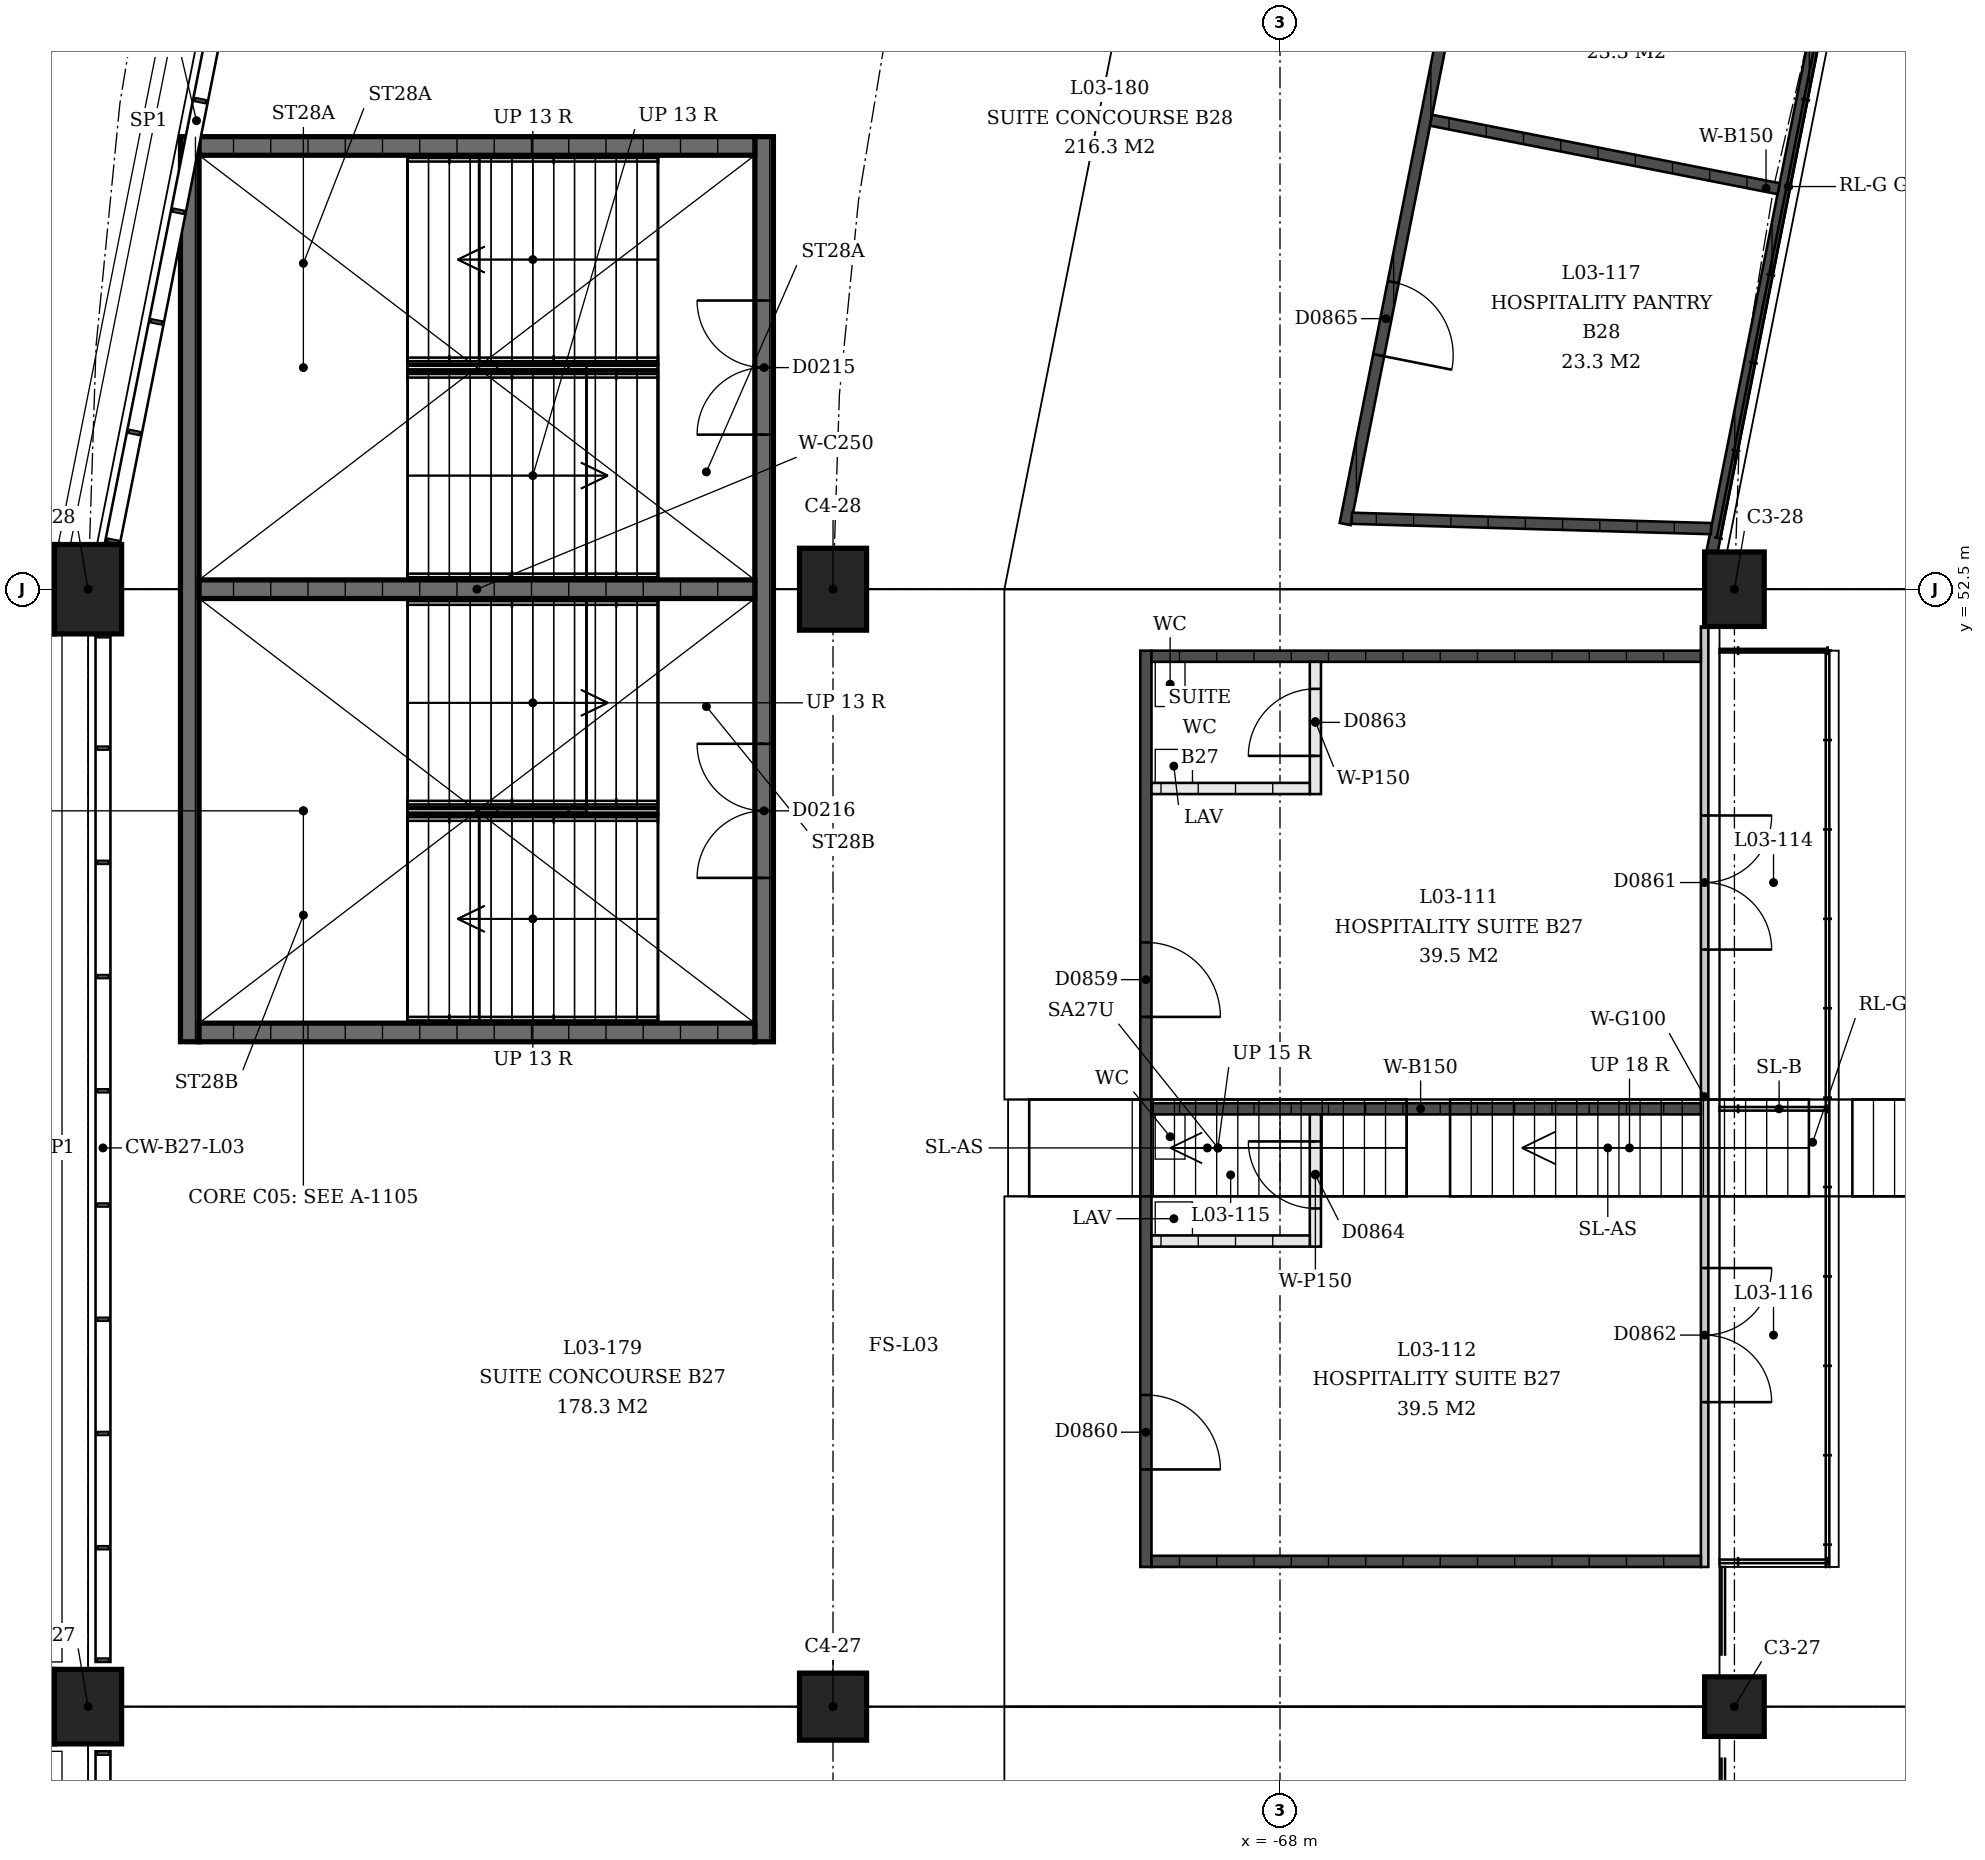
"""IFC4 building model, lengths in metres.
Left out: names, types, materials, properties, quantities, classifications, styles, units other than length and angle.
Written with IfcOpenShell. Run it as: python <this file> out.ifc"""

import sys

from ifc_helpers import new_model, si_unit, direction, frame, frame_2d, origin, origin_2d, place, context, subcontext, project, spatial, rectangle, extrude, element, fill, save


model = new_model("IFC4")
c1 = context("Model", 3, precision=1e-05, world=origin(), true_north=direction((0.0, 1.0)))
c2 = subcontext(c1, "Body", "Model", "MODEL_VIEW")
j1 = project(units=[si_unit("LENGTHUNIT", "METRE"), si_unit("PLANEANGLEUNIT", "RADIAN")], contexts=[c1])
p1 = place(None, origin())
s1 = spatial("IfcSite", under=j1, at=p1, CompositionType="ELEMENT")
p2 = place(p1, origin())
s2 = spatial("IfcBuilding", under=s1, at=p2, CompositionType="ELEMENT")
p3 = place(p2, frame((0.0, 0.0, 13.5)))
s3 = spatial("IfcBuildingStorey", under=s2, at=p3, CompositionType="ELEMENT", Elevation=13.5)
p4 = place(p3, frame((-61.9, 37.5, 0.0), z_axis=(0.0, 0.0, 1.0), x_axis=(0.0, -1.0, 0.0)))
e1 = element("IfcColumn", 1, at=p4, inside=s3, PredefinedType="COLUMN", context=c2, shape_type="SweptSolid", body=[
    extrude(rectangle(XDim=0.8, YDim=0.8, at=origin_2d()), origin(), (0.0, 0.0, 1.0), 2.033),
])
p5 = place(p3, frame((-74.0, 37.5, 0.0), z_axis=(0.0, 0.0, 1.0), x_axis=(0.0, -1.0, 0.0)))
e2 = element("IfcColumn", 2, at=p5, inside=s3, PredefinedType="COLUMN", context=c2, shape_type="SweptSolid", body=[
    extrude(rectangle(XDim=0.9, YDim=0.9, at=origin_2d()), origin(), (0.0, 0.0, 1.0), 4.5),
])
p6 = place(p3, frame((-84.0, 37.5, 0.0), z_axis=(0.0, 0.0, 1.0), x_axis=(0.0, -1.0, 0.0)))
e3 = element("IfcColumn", 3, at=p6, inside=s3, PredefinedType="COLUMN", context=c2, shape_type="SweptSolid", body=[
    extrude(rectangle(XDim=1.0, YDim=0.9, at=origin_2d()), origin(), (0.0, 0.0, 1.0), 4.5),
])
p7 = place(p3, frame((-61.9, 52.5, 0.0), z_axis=(0.0, 0.0, 1.0), x_axis=(0.0, -1.0, 0.0)))
e4 = element("IfcColumn", 4, at=p7, inside=s3, PredefinedType="COLUMN", context=c2, shape_type="SweptSolid", body=[
    extrude(rectangle(XDim=1.0, YDim=0.8, at=origin_2d()), origin(), (0.0, 0.0, 1.0), 2.033),
])
p8 = place(p3, frame((-74.0, 52.5, 0.0), z_axis=(0.0, 0.0, 1.0), x_axis=(0.0, -1.0, 0.0)))
e5 = element("IfcColumn", 5, at=p8, inside=s3, PredefinedType="COLUMN", context=c2, shape_type="SweptSolid", body=[
    extrude(rectangle(XDim=1.1, YDim=0.9, at=origin_2d()), origin(), (0.0, 0.0, 1.0), 4.5),
])
p9 = place(p3, frame((-84.0, 52.5, 0.0), z_axis=(0.0, 0.0, 1.0), x_axis=(0.0, -1.0, 0.0)))
e6 = element("IfcColumn", 6, at=p9, inside=s3, PredefinedType="COLUMN", context=c2, shape_type="SweptSolid", body=[
    extrude(rectangle(XDim=1.2, YDim=0.9, at=origin_2d()), origin(), (0.0, 0.0, 1.0), 4.5),
])
p10 = place(p3, frame((-74.925, 58.575, 0.0), z_axis=(0.0, 0.0, 1.0), x_axis=(0.0, -1.0, 0.0)))
e7 = element("IfcWall", 7, at=p10, inside=s3, PredefinedType="SHEAR", context=c2, shape_type="SweptSolid", body=[
    extrude(rectangle(XDim=12.15, YDim=0.25, at=frame_2d((6.075, 0.0))), origin(), (0.0, 0.0, 1.0), 4.09),
])
p11 = place(p10, frame((2.2, 0.0, 0.0)))
e8 = element("IfcOpeningElement", 8, at=p11, cuts=e7, PredefinedType="OPENING", context=c2, shape_type="SweptSolid", body=[
    extrude(rectangle(XDim=1.8, YDim=2.1, at=frame_2d((0.9, 1.05))), frame((0.0, 0.125, 0.0), z_axis=(0.0, -1.0, 0.0), x_axis=(1.0, 0.0, 0.0)), (0.0, 0.0, 1.0), 0.25),
])
p12 = place(p10, frame((8.15, 0.0, 0.0)))
e9 = element("IfcOpeningElement", 9, at=p12, cuts=e7, PredefinedType="OPENING", context=c2, shape_type="SweptSolid", body=[
    extrude(rectangle(XDim=1.8, YDim=2.1, at=frame_2d((0.9, 1.05))), frame((0.0, 0.125, 0.0), z_axis=(0.0, -1.0, 0.0), x_axis=(1.0, 0.0, 0.0)), (0.0, 0.0, 1.0), 0.25),
])
p13 = place(p3, frame((-82.635, 58.575, 0.0), z_axis=(0.0, 0.0, 1.0), x_axis=(0.0, -1.0, 0.0)))
e10 = element("IfcWall", 10, at=p13, inside=s3, PredefinedType="SHEAR", context=c2, shape_type="SweptSolid", body=[
    extrude(rectangle(XDim=12.15, YDim=0.25, at=frame_2d((6.075, 0.0))), origin(), (0.0, 0.0, 1.0), 4.09),
])
for number, where, z_axis, x_axis in (
    (11, (-75.05, 58.45, 0.0), (0.0, 0.0, 1.0), (-1.0, 0.0, 0.0)),
    (12, (-75.05, 46.55, 0.0), (0.0, 0.0, 1.0), (-1.0, 0.0, 0.0)),
    (13, (-75.05, 52.5, 0.0), (0.0, 0.0, 1.0), (-1.0, 0.0, 0.0)),
):
    element("IfcWall", number, at=place(p3, frame(where, z_axis=z_axis, x_axis=x_axis)), inside=s3, PredefinedType="SHEAR", context=c2, shape_type="SweptSolid", body=[
        extrude(rectangle(XDim=7.46, YDim=0.25, at=frame_2d((3.73, 0.0))), origin(), (0.0, 0.0, 1.0), 4.09),
    ])
p14 = place(p3, frame((-62.3, 52.0, 0.0), z_axis=(0.0, 0.0, 1.0), x_axis=(0.0, -1.0, 0.0)))
e14 = element("IfcWall", 14, at=p14, inside=s3, PredefinedType="PARTITIONING", context=c2, shape_type="SweptSolid", body=[
    extrude(rectangle(XDim=12.625, YDim=0.1, at=frame_2d((6.312, 0.0))), origin(), (0.0, 0.0, 1.0), 3.0),
])
p15 = place(p14, frame((2.538, 0.0, 0.0)))
e15 = element("IfcOpeningElement", 15, at=p15, cuts=e14, PredefinedType="OPENING", context=c2, shape_type="SweptSolid", body=[
    extrude(rectangle(XDim=1.8, YDim=2.1, at=frame_2d((0.9, 1.05))), frame((0.0, 0.05, 0.0), z_axis=(0.0, -1.0, 0.0), x_axis=(1.0, 0.0, 0.0)), (0.0, 0.0, 1.0), 0.1),
])
p16 = place(p14, frame((8.613, 0.0, 0.0)))
e16 = element("IfcOpeningElement", 16, at=p16, cuts=e14, PredefinedType="OPENING", context=c2, shape_type="SweptSolid", body=[
    extrude(rectangle(XDim=1.8, YDim=2.1, at=frame_2d((0.9, 1.05))), frame((0.0, 0.05, 0.0), z_axis=(0.0, -1.0, 0.0), x_axis=(1.0, 0.0, 0.0)), (0.0, 0.0, 1.0), 0.1),
])
p17 = place(p3, frame((-69.8, 51.675, 0.0), z_axis=(0.0, 0.0, 1.0), x_axis=(0.0, -1.0, 0.0)))
e17 = element("IfcWall", 17, at=p17, inside=s3, PredefinedType="SOLIDWALL", context=c2, shape_type="SweptSolid", body=[
    extrude(rectangle(XDim=12.3, YDim=0.15, at=frame_2d((6.15, 0.0))), origin(), (0.0, 0.0, 1.0), 3.0),
])
p18 = place(p17, frame((3.916, 0.0, 0.0)))
e18 = element("IfcOpeningElement", 18, at=p18, cuts=e17, PredefinedType="OPENING", context=c2, shape_type="SweptSolid", body=[
    extrude(rectangle(XDim=1.0, YDim=2.1, at=frame_2d((0.5, 1.05))), frame((0.0, 0.075, 0.0), z_axis=(0.0, -1.0, 0.0), x_axis=(1.0, 0.0, 0.0)), (0.0, 0.0, 1.0), 0.15),
])
p19 = place(p17, frame((9.991, 0.0, 0.0)))
e19 = element("IfcOpeningElement", 19, at=p19, cuts=e17, PredefinedType="OPENING", context=c2, shape_type="SweptSolid", body=[
    extrude(rectangle(XDim=1.0, YDim=2.1, at=frame_2d((0.5, 1.05))), frame((0.0, 0.075, 0.0), z_axis=(0.0, -1.0, 0.0), x_axis=(1.0, 0.0, 0.0)), (0.0, 0.0, 1.0), 0.15),
])
for number, where, z_axis, x_axis in (
    (20, (-62.35, 51.6, 0.0), (0.0, 0.0, 1.0), (-1.0, 0.0, 0.0)),
    (21, (-62.35, 45.525, 0.0), (0.0, 0.0, 1.0), (-1.0, 0.0, 0.0)),
    (22, (-62.35, 39.45, 0.0), (0.0, 0.0, 1.0), (-1.0, 0.0, 0.0)),
):
    element("IfcWall", number, at=place(p3, frame(where, z_axis=z_axis, x_axis=x_axis)), inside=s3, PredefinedType="SOLIDWALL", context=c2, shape_type="SweptSolid", body=[
        extrude(rectangle(XDim=7.375, YDim=0.15, at=frame_2d((3.688, 0.0))), origin(), (0.0, 0.0, 1.0), 3.0),
    ])
p20 = place(p3, frame((-67.525, 51.525, 0.0), z_axis=(0.0, 0.0, 1.0), x_axis=(0.0, -1.0, 0.0)))
e23 = element("IfcWall", 23, at=p20, inside=s3, PredefinedType="PARTITIONING", context=c2, shape_type="SweptSolid", body=[
    extrude(rectangle(XDim=1.775, YDim=0.15, at=frame_2d((0.887, 0.0))), origin(), (0.0, 0.0, 1.0), 3.0),
])
p21 = place(p20, frame((0.363, 0.0, 0.0)))
e24 = element("IfcOpeningElement", 24, at=p21, cuts=e23, PredefinedType="OPENING", context=c2, shape_type="SweptSolid", body=[
    extrude(rectangle(XDim=0.9, YDim=2.1, at=frame_2d((0.45, 1.05))), frame((0.0, 0.075, 0.0), z_axis=(0.0, -1.0, 0.0), x_axis=(1.0, 0.0, 0.0)), (0.0, 0.0, 1.0), 0.15),
])
p22 = place(p3, frame((-67.6, 49.825, 0.0), z_axis=(0.0, 0.0, 1.0), x_axis=(-1.0, 0.0, 0.0)))
e25 = element("IfcWall", 25, at=p22, inside=s3, PredefinedType="PARTITIONING", context=c2, shape_type="SweptSolid", body=[
    extrude(rectangle(XDim=2.125, YDim=0.15, at=frame_2d((1.062, 0.0))), origin(), (0.0, 0.0, 1.0), 3.0),
])
p23 = place(p3, frame((-67.525, 45.45, 0.0), z_axis=(0.0, 0.0, 1.0), x_axis=(0.0, -1.0, 0.0)))
e26 = element("IfcWall", 26, at=p23, inside=s3, PredefinedType="PARTITIONING", context=c2, shape_type="SweptSolid", body=[
    extrude(rectangle(XDim=1.775, YDim=0.15, at=frame_2d((0.887, 0.0))), origin(), (0.0, 0.0, 1.0), 3.0),
])
p24 = place(p23, frame((0.363, 0.0, 0.0)))
e27 = element("IfcOpeningElement", 27, at=p24, cuts=e26, PredefinedType="OPENING", context=c2, shape_type="SweptSolid", body=[
    extrude(rectangle(XDim=0.9, YDim=2.1, at=frame_2d((0.45, 1.05))), frame((0.0, 0.075, 0.0), z_axis=(0.0, -1.0, 0.0), x_axis=(1.0, 0.0, 0.0)), (0.0, 0.0, 1.0), 0.15),
])
p25 = place(p3, frame((-67.6, 43.75, 0.0), z_axis=(0.0, 0.0, 1.0), x_axis=(-1.0, 0.0, 0.0)))
e28 = element("IfcWall", 28, at=p25, inside=s3, PredefinedType="PARTITIONING", context=c2, shape_type="SweptSolid", body=[
    extrude(rectangle(XDim=2.125, YDim=0.15, at=frame_2d((1.062, 0.0))), origin(), (0.0, 0.0, 1.0), 3.0),
])
p26 = place(p3, frame((-62.2, 53.0, 0.0), z_axis=(0.0, 0.0, 1.0), x_axis=(0.195076647143, 0.980788000406, 0.0)))
e29 = element("IfcWall", 29, at=p26, inside=s3, PredefinedType="SOLIDWALL", context=c2, shape_type="SweptSolid", body=[
    extrude(rectangle(XDim=9.667, YDim=0.15, at=frame_2d((4.833, 0.0))), origin(), (0.0, 0.0, 1.0), 3.0),
])
p27 = place(p3, frame((-67.126, 53.375, 0.0), z_axis=(0.0, 0.0, 1.0), x_axis=(0.195090821685, 0.980785181013, 0.0)))
e30 = element("IfcWall", 30, at=p27, inside=s3, PredefinedType="SOLIDWALL", context=c2, shape_type="SweptSolid", body=[
    extrude(rectangle(XDim=11.083, YDim=0.15, at=frame_2d((5.541, 0.0))), origin(), (0.0, 0.0, 1.0), 3.0),
])
p28 = place(p27, frame((2.311, 0.0, 0.0)))
e31 = element("IfcOpeningElement", 31, at=p28, cuts=e30, PredefinedType="OPENING", context=c2, shape_type="SweptSolid", body=[
    extrude(rectangle(XDim=1.0, YDim=2.1, at=frame_2d((0.5, 1.05))), frame((0.0, 0.075, 0.0), z_axis=(0.0, -1.0, 0.0), x_axis=(1.0, 0.0, 0.0)), (0.0, 0.0, 1.0), 0.15),
])
p29 = place(p27, frame((7.771, 0.0, 0.0)))
e32 = element("IfcOpeningElement", 32, at=p29, cuts=e30, PredefinedType="OPENING", context=c2, shape_type="SweptSolid", body=[
    extrude(rectangle(XDim=1.0, YDim=2.1, at=frame_2d((0.5, 1.05))), frame((0.0, 0.075, 0.0), z_axis=(0.0, -1.0, 0.0), x_axis=(1.0, 0.0, 0.0)), (0.0, 0.0, 1.0), 0.15),
])
p30 = place(p3, frame((-62.213, 53.313, 0.0), z_axis=(0.0, 0.0, 1.0), x_axis=(-0.999585372371, 0.028793807365, 0.0)))
e33 = element("IfcWall", 33, at=p30, inside=s3, PredefinedType="SOLIDWALL", context=c2, shape_type="SweptSolid", body=[
    extrude(rectangle(XDim=4.824, YDim=0.15, at=frame_2d((2.412, 0.0))), origin(), (0.0, 0.0, 1.0), 3.0),
])
p31 = place(p3, frame((-61.306, 57.876, 0.0), z_axis=(0.0, 0.0, 1.0), x_axis=(-0.98116065749, 0.193193592529, 0.0)))
e34 = element("IfcWall", 34, at=p31, inside=s3, PredefinedType="SOLIDWALL", context=c2, shape_type="SweptSolid", body=[
    extrude(rectangle(XDim=4.757, YDim=0.15, at=frame_2d((2.378, 0.0))), origin(), (0.0, 0.0, 1.0), 3.0),
])
p32 = place(p11, origin())
e35 = element("IfcDoor", 35, at=p32, inside=s3, OperationType="DOUBLE_DOOR_SINGLE_SWING", PredefinedType="DOOR", context=c2, shape_type="SweptSolid", body=[
    extrude(rectangle(XDim=1.8, YDim=2.1, at=frame_2d((0.9, 1.05))), frame((0.0, 0.025, 0.0), z_axis=(0.0, -1.0, 0.0), x_axis=(1.0, 0.0, 0.0)), (0.0, 0.0, 1.0), 0.05),
])
fill(e8, e35)
p33 = place(p12, origin())
e36 = element("IfcDoor", 36, at=p33, inside=s3, OperationType="DOUBLE_DOOR_SINGLE_SWING", PredefinedType="DOOR", context=c2, shape_type="SweptSolid", body=[
    extrude(rectangle(XDim=1.8, YDim=2.1, at=frame_2d((0.9, 1.05))), frame((0.0, 0.025, 0.0), z_axis=(0.0, -1.0, 0.0), x_axis=(1.0, 0.0, 0.0)), (0.0, 0.0, 1.0), 0.05),
])
fill(e9, e36)
p34 = place(p18, origin())
e37 = element("IfcDoor", 37, at=p34, inside=s3, OperationType="SINGLE_SWING_LEFT", PredefinedType="DOOR", context=c2, shape_type="SweptSolid", body=[
    extrude(rectangle(XDim=1.0, YDim=2.1, at=frame_2d((0.5, 1.05))), frame((0.0, 0.025, 0.0), z_axis=(0.0, -1.0, 0.0), x_axis=(1.0, 0.0, 0.0)), (0.0, 0.0, 1.0), 0.05),
])
fill(e18, e37)
p35 = place(p19, origin())
e38 = element("IfcDoor", 38, at=p35, inside=s3, OperationType="SINGLE_SWING_LEFT", PredefinedType="DOOR", context=c2, shape_type="SweptSolid", body=[
    extrude(rectangle(XDim=1.0, YDim=2.1, at=frame_2d((0.5, 1.05))), frame((0.0, 0.025, 0.0), z_axis=(0.0, -1.0, 0.0), x_axis=(1.0, 0.0, 0.0)), (0.0, 0.0, 1.0), 0.05),
])
fill(e19, e38)
p36 = place(p15, origin())
e39 = element("IfcDoor", 39, at=p36, inside=s3, OperationType="DOUBLE_DOOR_SINGLE_SWING", PredefinedType="DOOR", context=c2, shape_type="SweptSolid", body=[
    extrude(rectangle(XDim=1.8, YDim=2.1, at=frame_2d((0.9, 1.05))), frame((0.0, 0.025, 0.0), z_axis=(0.0, -1.0, 0.0), x_axis=(1.0, 0.0, 0.0)), (0.0, 0.0, 1.0), 0.05),
])
fill(e15, e39)
p37 = place(p16, origin())
e40 = element("IfcDoor", 40, at=p37, inside=s3, OperationType="DOUBLE_DOOR_SINGLE_SWING", PredefinedType="DOOR", context=c2, shape_type="SweptSolid", body=[
    extrude(rectangle(XDim=1.8, YDim=2.1, at=frame_2d((0.9, 1.05))), frame((0.0, 0.025, 0.0), z_axis=(0.0, -1.0, 0.0), x_axis=(1.0, 0.0, 0.0)), (0.0, 0.0, 1.0), 0.05),
])
fill(e16, e40)
p38 = place(p21, origin())
e41 = element("IfcDoor", 41, at=p38, inside=s3, OperationType="SINGLE_SWING_RIGHT", PredefinedType="DOOR", context=c2, shape_type="SweptSolid", body=[
    extrude(rectangle(XDim=0.9, YDim=2.1, at=frame_2d((0.45, 1.05))), frame((0.0, 0.025, 0.0), z_axis=(0.0, -1.0, 0.0), x_axis=(1.0, 0.0, 0.0)), (0.0, 0.0, 1.0), 0.05),
])
fill(e24, e41)
p39 = place(p24, origin())
e42 = element("IfcDoor", 42, at=p39, inside=s3, OperationType="SINGLE_SWING_LEFT", PredefinedType="DOOR", context=c2, shape_type="SweptSolid", body=[
    extrude(rectangle(XDim=0.9, YDim=2.1, at=frame_2d((0.45, 1.05))), frame((0.0, 0.025, 0.0), z_axis=(0.0, -1.0, 0.0), x_axis=(1.0, 0.0, 0.0)), (0.0, 0.0, 1.0), 0.05),
])
fill(e27, e42)
p40 = place(p28, origin())
e43 = element("IfcDoor", 43, at=p40, inside=s3, OperationType="SINGLE_SWING_LEFT", PredefinedType="DOOR", context=c2, shape_type="SweptSolid", body=[
    extrude(rectangle(XDim=1.0, YDim=2.1, at=frame_2d((0.5, 1.05))), frame((0.0, 0.025, 0.0), z_axis=(0.0, -1.0, 0.0), x_axis=(1.0, 0.0, 0.0)), (0.0, 0.0, 1.0), 0.05),
])
fill(e31, e43)
save(model, sys.argv[1])
